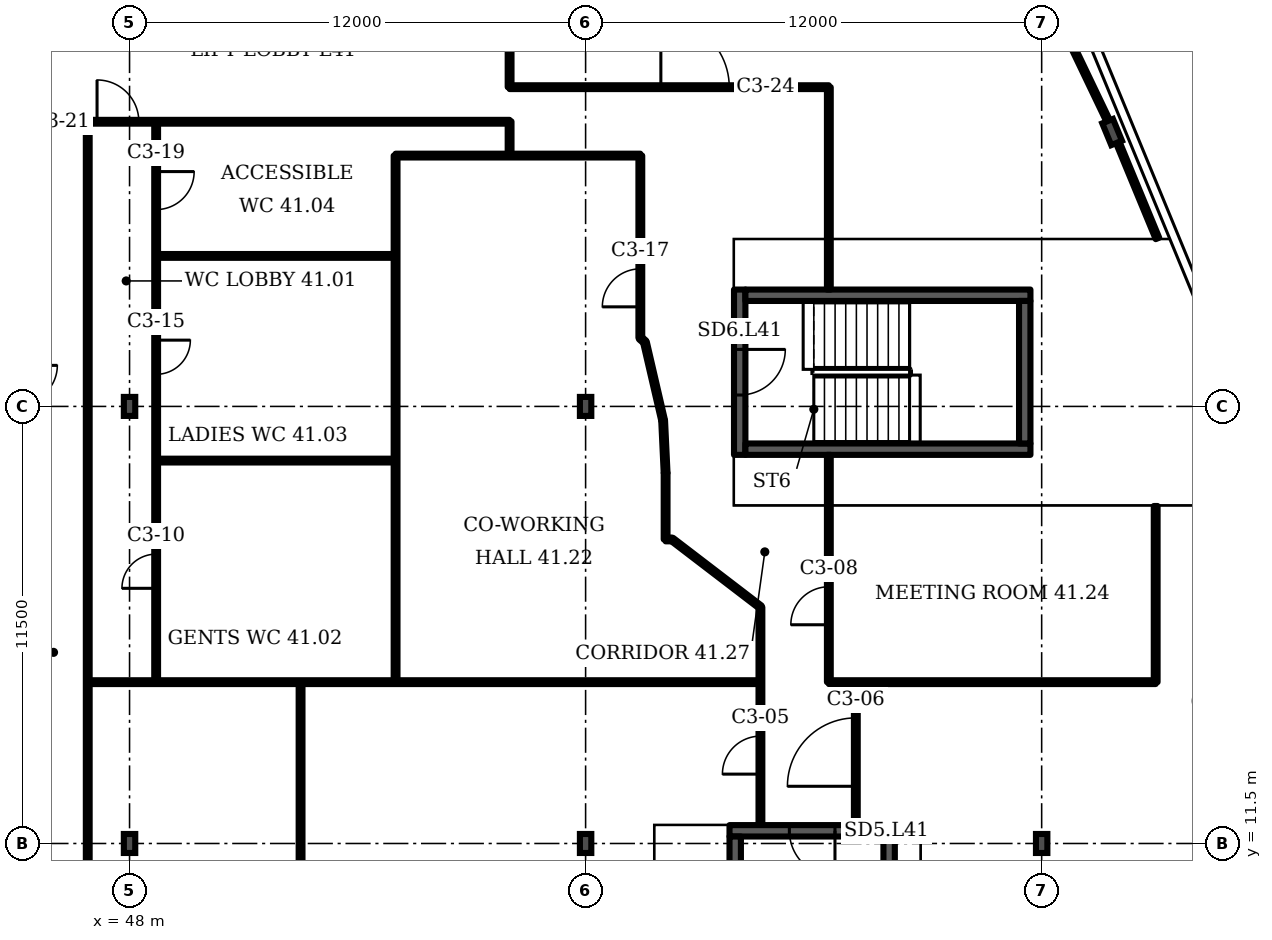
"""IFC4 building model, lengths in metres.
Left out: names, types, materials, properties, quantities, classifications, styles, units other than length and angle.
Written with IfcOpenShell. Run it as: python <this file> out.ifc"""

import sys

from ifc_helpers import new_model, si_unit, direction, frame, frame_2d, origin, origin_2d, place, context, subcontext, project, spatial, rectangle, i_section, extrude, element, fill, save


model = new_model("IFC4")
c1 = context("Model", 3, precision=1e-05, world=origin(), true_north=direction((0.0, 1.0)))
c2 = subcontext(c1, "Body", "Model", "MODEL_VIEW")
j1 = project(units=[si_unit("LENGTHUNIT", "METRE"), si_unit("PLANEANGLEUNIT", "RADIAN")], contexts=[c1])
p1 = place(None, origin())
s1 = spatial("IfcSite", under=j1, at=p1, CompositionType="ELEMENT")
p2 = place(p1, origin())
s2 = spatial("IfcBuilding", under=s1, at=p2, CompositionType="ELEMENT")
p3 = place(p2, frame((0.0, 0.0, 169.9)))
s3 = spatial("IfcBuildingStorey", under=s2, at=p3, CompositionType="ELEMENT", Elevation=169.9)
p4 = place(p3, frame((73.854, 30.219, 0.0), z_axis=(0.0, 0.0, 1.0), x_axis=(0.924325, 0.381602, 0.0)))
e1 = element("IfcColumn", 1, at=p4, inside=s3, PredefinedType="COLUMN", context=c2, shape_type="SweptSolid", body=[
    extrude(i_section(OverallWidth=0.305, OverallDepth=0.62, WebThickness=0.021, FlangeThickness=0.04, FilletRadius=0.027, at=origin_2d()), origin(), (0.0, 0.0, 1.0), 3.6),
])
for number, where, z_axis, x_axis in (
    (2, (48.0, 11.5, 0.0), (0.0, 0.0, 1.0), (1.0, 0.0, 0.0)),
    (3, (60.0, 11.5, 0.0), (0.0, 0.0, 1.0), (1.0, 0.0, 0.0)),
    (4, (72.0, 11.5, 0.0), (0.0, 0.0, 1.0), (1.0, 0.0, 0.0)),
    (5, (48.0, 23.0, 0.0), (0.0, 0.0, 1.0), (1.0, 0.0, 0.0)),
    (6, (60.0, 23.0, 0.0), (0.0, 0.0, 1.0), (1.0, 0.0, 0.0)),
):
    element("IfcColumn", number, at=place(p3, frame(where, z_axis=z_axis, x_axis=x_axis)), inside=s3, PredefinedType="COLUMN", context=c2, shape_type="SweptSolid", body=[
        extrude(i_section(OverallWidth=0.3, OverallDepth=0.5, WebThickness=0.014, FlangeThickness=0.028, FilletRadius=0.027, at=origin_2d()), origin(), (0.0, 0.0, 1.0), 3.6),
    ])
p5 = place(p3, frame((63.786, 11.834, 0.0), z_axis=(0.0, 0.0, 1.0), x_axis=(1.0, 0.0, 0.0)))
e7 = element("IfcWall", 7, at=p5, inside=s3, PredefinedType="SHEAR", context=c2, shape_type="SweptSolid", body=[
    extrude(rectangle(XDim=4.35, YDim=0.3, at=frame_2d((2.175, 0.0))), origin(), (0.0, 0.0, 1.0), 3.2),
])
p6 = place(p5, frame((1.575, 0.0, 0.0)))
e8 = element("IfcOpeningElement", 8, at=p6, cuts=e7, PredefinedType="OPENING", context=c2, shape_type="SweptSolid", body=[
    extrude(rectangle(XDim=1.2, YDim=2.1, at=frame_2d((0.6, 1.05))), frame((0.0, 0.16, 0.0), z_axis=(0.0, -1.0, 0.0), x_axis=(1.0, 0.0, 0.0)), (0.0, 0.0, 1.0), 0.32),
])
p7 = place(p3, frame((64.055, 21.725, 0.0), z_axis=(0.0, 0.0, 1.0), x_axis=(0.0, 1.0, 0.0)))
e9 = element("IfcWall", 9, at=p7, inside=s3, PredefinedType="SHEAR", context=c2, shape_type="SweptSolid", body=[
    extrude(rectangle(XDim=4.35, YDim=0.3, at=frame_2d((2.175, 0.0))), origin(), (0.0, 0.0, 1.0), 3.2),
])
p8 = place(p7, frame((1.575, 0.0, 0.0)))
e10 = element("IfcOpeningElement", 10, at=p8, cuts=e9, PredefinedType="OPENING", context=c2, shape_type="SweptSolid", body=[
    extrude(rectangle(XDim=1.2, YDim=2.1, at=frame_2d((0.6, 1.05))), frame((0.0, 0.16, 0.0), z_axis=(0.0, -1.0, 0.0), x_axis=(1.0, 0.0, 0.0)), (0.0, 0.0, 1.0), 0.32),
])
p9 = place(p3, frame((46.9, 1.087, 0.0), z_axis=(0.0, 0.0, 1.0), x_axis=(0.0, 1.0, 0.0)))
e11 = element("IfcWall", 11, at=p9, inside=s3, PredefinedType="PARTITIONING", context=c2, shape_type="SweptSolid", body=[
    extrude(rectangle(XDim=29.403, YDim=0.1, at=frame_2d((14.702, 0.0))), origin(), (0.0, 0.0, 1.0), 3.2),
])
p10 = place(p9, frame((6.798, 0.0, 0.0)))
e12 = element("IfcOpeningElement", 12, at=p10, cuts=e11, PredefinedType="OPENING", context=c2, shape_type="SweptSolid", body=[
    extrude(rectangle(XDim=1.0, YDim=2.1, at=frame_2d((0.5, 1.05))), frame((0.0, 0.06, 0.0), z_axis=(0.0, -1.0, 0.0), x_axis=(1.0, 0.0, 0.0)), (0.0, 0.0, 1.0), 0.12),
])
p11 = place(p3, frame((46.91, 15.745, 0.0), z_axis=(0.0, 0.0, 1.0), x_axis=(1.0, 0.0, 0.0)))
e13 = element("IfcWall", 13, at=p11, inside=s3, PredefinedType="PARTITIONING", context=c2, shape_type="SweptSolid", body=[
    extrude(rectangle(XDim=17.69, YDim=0.1, at=frame_2d((8.845, 0.0))), origin(), (0.0, 0.0, 1.0), 3.2),
])
p12 = place(p3, frame((46.91, 30.49, 0.0), z_axis=(0.0, 0.0, 1.0), x_axis=(1.0, 0.0, 0.0)))
e14 = element("IfcWall", 14, at=p12, inside=s3, PredefinedType="PARTITIONING", context=c2, shape_type="SweptSolid", body=[
    extrude(rectangle(XDim=11.09, YDim=0.1, at=frame_2d((5.545, 0.0))), origin(), (0.0, 0.0, 1.0), 3.2),
])
p13 = place(p12, frame((0.235, 0.0, 0.0)))
e15 = element("IfcOpeningElement", 15, at=p13, cuts=e14, PredefinedType="OPENING", context=c2, shape_type="SweptSolid", body=[
    extrude(rectangle(XDim=1.1, YDim=2.1, at=frame_2d((0.55, 1.05))), frame((0.0, 0.06, 0.0), z_axis=(0.0, -1.0, 0.0), x_axis=(1.0, 0.0, 0.0)), (0.0, 0.0, 1.0), 0.12),
])
p14 = place(p3, frame((48.7, 15.745, 0.0), z_axis=(0.0, 0.0, 1.0), x_axis=(0.0, 1.0, 0.0)))
e16 = element("IfcWall", 16, at=p14, inside=s3, PredefinedType="PARTITIONING", context=c2, shape_type="SweptSolid", body=[
    extrude(rectangle(XDim=14.745, YDim=0.1, at=frame_2d((7.373, 0.0))), origin(), (0.0, 0.0, 1.0), 3.2),
])
p15 = place(p14, frame((2.469, 0.0, 0.0)))
e17 = element("IfcOpeningElement", 17, at=p15, cuts=e16, PredefinedType="OPENING", context=c2, shape_type="SweptSolid", body=[
    extrude(rectangle(XDim=0.9, YDim=2.1, at=frame_2d((0.45, 1.05))), frame((0.0, 0.06, 0.0), z_axis=(0.0, -1.0, 0.0), x_axis=(1.0, 0.0, 0.0)), (0.0, 0.0, 1.0), 0.12),
])
p16 = place(p14, frame((8.099, 0.0, 0.0)))
e18 = element("IfcOpeningElement", 18, at=p16, cuts=e16, PredefinedType="OPENING", context=c2, shape_type="SweptSolid", body=[
    extrude(rectangle(XDim=0.9, YDim=2.1, at=frame_2d((0.45, 1.05))), frame((0.0, 0.06, 0.0), z_axis=(0.0, -1.0, 0.0), x_axis=(1.0, 0.0, 0.0)), (0.0, 0.0, 1.0), 0.12),
])
p17 = place(p14, frame((12.434, 0.0, 0.0)))
e19 = element("IfcOpeningElement", 19, at=p17, cuts=e16, PredefinedType="OPENING", context=c2, shape_type="SweptSolid", body=[
    extrude(rectangle(XDim=1.0, YDim=2.1, at=frame_2d((0.5, 1.05))), frame((0.0, 0.06, 0.0), z_axis=(0.0, -1.0, 0.0), x_axis=(1.0, 0.0, 0.0)), (0.0, 0.0, 1.0), 0.12),
])
for number, where, z_axis, x_axis in (
    (20, (48.7, 21.575, 0.0), (0.0, 0.0, 1.0), (1.0, 0.0, 0.0)),
    (21, (48.7, 26.96, 0.0), (0.0, 0.0, 1.0), (1.0, 0.0, 0.0)),
):
    element("IfcWall", number, at=place(p3, frame(where, z_axis=z_axis, x_axis=x_axis)), inside=s3, PredefinedType="PARTITIONING", context=c2, shape_type="SweptSolid", body=[
        extrude(rectangle(XDim=6.3, YDim=0.1, at=frame_2d((3.15, 0.0))), origin(), (0.0, 0.0, 1.0), 3.2),
    ])
p18 = place(p3, frame((52.5, 1.98, 0.0), z_axis=(0.0, 0.0, 1.0), x_axis=(0.0, 1.0, 0.0)))
e22 = element("IfcWall", 22, at=p18, inside=s3, PredefinedType="PARTITIONING", context=c2, shape_type="SweptSolid", body=[
    extrude(rectangle(XDim=13.765, YDim=0.1, at=frame_2d((6.883, 0.0))), origin(), (0.0, 0.0, 1.0), 3.2),
])
p19 = place(p3, frame((55.0, 15.745, 0.0), z_axis=(0.0, 0.0, 1.0), x_axis=(0.0, 1.0, 0.0)))
e23 = element("IfcWall", 23, at=p19, inside=s3, PredefinedType="PARTITIONING", context=c2, shape_type="SweptSolid", body=[
    extrude(rectangle(XDim=13.855, YDim=0.1, at=frame_2d((6.927, 0.0))), origin(), (0.0, 0.0, 1.0), 3.2),
])
p20 = place(p3, frame((55.0, 29.6, 0.0), z_axis=(0.0, 0.0, 1.0), x_axis=(1.0, 0.0, 0.0)))
e24 = element("IfcWall", 24, at=p20, inside=s3, PredefinedType="PARTITIONING", context=c2, shape_type="SweptSolid", body=[
    extrude(rectangle(XDim=6.44, YDim=0.1, at=frame_2d((3.22, 0.0))), origin(), (0.0, 0.0, 1.0), 3.2),
])
p21 = place(p3, frame((58.0, 29.6, 0.0), z_axis=(0.0, 0.0, 1.0), x_axis=(0.0, 1.0, 0.0)))
e25 = element("IfcWall", 25, at=p21, inside=s3, PredefinedType="PARTITIONING", context=c2, shape_type="SweptSolid", body=[
    extrude(rectangle(XDim=0.9, YDim=0.1, at=frame_2d((0.45, 0.0))), origin(), (0.0, 0.0, 1.0), 3.2),
])
p22 = place(p3, frame((58.0, 31.4, 0.0), z_axis=(0.0, 0.0, 1.0), x_axis=(0.0, 1.0, 0.0)))
e26 = element("IfcWall", 26, at=p22, inside=s3, PredefinedType="PARTITIONING", context=c2, shape_type="SweptSolid", body=[
    extrude(rectangle(XDim=2.58, YDim=0.1, at=frame_2d((1.29, 0.0))), origin(), (0.0, 0.0, 1.0), 3.2),
])
p23 = place(p3, frame((58.0, 31.4, 0.0), z_axis=(0.0, 0.0, 1.0), x_axis=(1.0, 0.0, 0.0)))
e27 = element("IfcWall", 27, at=p23, inside=s3, PredefinedType="PARTITIONING", context=c2, shape_type="SweptSolid", body=[
    extrude(rectangle(XDim=8.4, YDim=0.1, at=frame_2d((4.2, 0.0))), origin(), (0.0, 0.0, 1.0), 3.2),
])
p24 = place(p23, frame((3.98, 0.0, 0.0)))
e28 = element("IfcOpeningElement", 28, at=p24, cuts=e27, PredefinedType="OPENING", context=c2, shape_type="SweptSolid", body=[
    extrude(rectangle(XDim=1.8, YDim=2.1, at=frame_2d((0.9, 1.05))), frame((0.0, 0.06, 0.0), z_axis=(0.0, -1.0, 0.0), x_axis=(1.0, 0.0, 0.0)), (0.0, 0.0, 1.0), 0.12),
])
p25 = place(p3, frame((61.44, 24.8, 0.0), z_axis=(0.0, 0.0, 1.0), x_axis=(0.0, 1.0, 0.0)))
e29 = element("IfcWall", 29, at=p25, inside=s3, PredefinedType="PARTITIONING", context=c2, shape_type="SweptSolid", body=[
    extrude(rectangle(XDim=4.8, YDim=0.1, at=frame_2d((2.4, 0.0))), origin(), (0.0, 0.0, 1.0), 3.2),
])
p26 = place(p25, frame((0.82, 0.0, 0.0)))
e30 = element("IfcOpeningElement", 30, at=p26, cuts=e29, PredefinedType="OPENING", context=c2, shape_type="SweptSolid", body=[
    extrude(rectangle(XDim=1.0, YDim=2.1, at=frame_2d((0.5, 1.05))), frame((0.0, 0.06, 0.0), z_axis=(0.0, -1.0, 0.0), x_axis=(1.0, 0.0, 0.0)), (0.0, 0.0, 1.0), 0.12),
])
p27 = place(p3, frame((61.56, 24.695, 0.0), z_axis=(0.0, 0.0, 1.0), x_axis=(-0.752958, 0.658073, 0.0)))
e31 = element("IfcWall", 31, at=p27, inside=s3, PredefinedType="PARTITIONING", context=c2, shape_type="SweptSolid", body=[
    extrude(rectangle(XDim=0.159, YDim=0.1, at=frame_2d((0.08, 0.0))), origin(), (0.0, 0.0, 1.0), 3.2),
])
p28 = place(p3, frame((62.04, 22.63, 0.0), z_axis=(0.0, 0.0, 1.0), x_axis=(-0.226381, 0.974037, 0.0)))
e32 = element("IfcWall", 32, at=p28, inside=s3, PredefinedType="PARTITIONING", context=c2, shape_type="SweptSolid", body=[
    extrude(rectangle(XDim=2.12, YDim=0.1, at=frame_2d((1.06, 0.0))), origin(), (0.0, 0.0, 1.0), 3.2),
])
p29 = place(p3, frame((62.105, 19.5, 0.0), z_axis=(0.0, 0.0, 1.0), x_axis=(0.0, 1.0, 0.0)))
e33 = element("IfcWall", 33, at=p29, inside=s3, PredefinedType="PARTITIONING", context=c2, shape_type="SweptSolid", body=[
    extrude(rectangle(XDim=1.75, YDim=0.1, at=frame_2d((0.875, 0.0))), origin(), (0.0, 0.0, 1.0), 3.2),
])
p30 = place(p3, frame((62.105, 19.5, 0.0), z_axis=(0.0, 0.0, 1.0), x_axis=(1.0, 0.0, 0.0)))
e34 = element("IfcWall", 34, at=p30, inside=s3, PredefinedType="PARTITIONING", context=c2, shape_type="SweptSolid", body=[
    extrude(rectangle(XDim=0.17, YDim=0.1, at=frame_2d((0.085, 0.0))), origin(), (0.0, 0.0, 1.0), 3.2),
])
p31 = place(p3, frame((62.105, 21.25, 0.0), z_axis=(0.0, 0.0, 1.0), x_axis=(-0.047011, 0.998895, 0.0)))
e35 = element("IfcWall", 35, at=p31, inside=s3, PredefinedType="PARTITIONING", context=c2, shape_type="SweptSolid", body=[
    extrude(rectangle(XDim=1.381, YDim=0.1, at=frame_2d((0.691, 0.0))), origin(), (0.0, 0.0, 1.0), 3.2),
])
p32 = place(p3, frame((64.6, 12.004, 0.0), z_axis=(0.0, 0.0, 1.0), x_axis=(0.0, 1.0, 0.0)))
e36 = element("IfcWall", 36, at=p32, inside=s3, PredefinedType="PARTITIONING", context=c2, shape_type="SweptSolid", body=[
    extrude(rectangle(XDim=5.716, YDim=0.1, at=frame_2d((2.858, 0.0))), origin(), (0.0, 0.0, 1.0), 3.2),
])
p33 = place(p32, frame((1.321, 0.0, 0.0)))
e37 = element("IfcOpeningElement", 37, at=p33, cuts=e36, PredefinedType="OPENING", context=c2, shape_type="SweptSolid", body=[
    extrude(rectangle(XDim=1.0, YDim=2.1, at=frame_2d((0.5, 1.05))), frame((0.0, 0.06, 0.0), z_axis=(0.0, -1.0, 0.0), x_axis=(1.0, 0.0, 0.0)), (0.0, 0.0, 1.0), 0.12),
])
p34 = place(p3, frame((64.6, 17.72, 0.0), z_axis=(0.0, 0.0, 1.0), x_axis=(-0.794036, 0.607866, 0.0)))
e38 = element("IfcWall", 38, at=p34, inside=s3, PredefinedType="PARTITIONING", context=c2, shape_type="SweptSolid", body=[
    extrude(rectangle(XDim=2.928, YDim=0.1, at=frame_2d((1.464, 0.0))), origin(), (0.0, 0.0, 1.0), 3.2),
])
p35 = place(p3, frame((66.4, 15.745, 0.0), z_axis=(0.0, 0.0, 1.0), x_axis=(0.0, 1.0, 0.0)))
e39 = element("IfcWall", 39, at=p35, inside=s3, PredefinedType="PARTITIONING", context=c2, shape_type="SweptSolid", body=[
    extrude(rectangle(XDim=5.98, YDim=0.1, at=frame_2d((2.99, 0.0))), origin(), (0.0, 0.0, 1.0), 3.2),
])
p36 = place(p35, frame((1.51, 0.0, 0.0)))
e40 = element("IfcOpeningElement", 40, at=p36, cuts=e39, PredefinedType="OPENING", context=c2, shape_type="SweptSolid", body=[
    extrude(rectangle(XDim=1.0, YDim=2.1, at=frame_2d((0.5, 1.05))), frame((0.0, 0.06, 0.0), z_axis=(0.0, -1.0, 0.0), x_axis=(1.0, 0.0, 0.0)), (0.0, 0.0, 1.0), 0.12),
])
p37 = place(p3, frame((66.4, 15.745, 0.0), z_axis=(0.0, 0.0, 1.0), x_axis=(1.0, 0.0, 0.0)))
e41 = element("IfcWall", 41, at=p37, inside=s3, PredefinedType="PARTITIONING", context=c2, shape_type="SweptSolid", body=[
    extrude(rectangle(XDim=8.6, YDim=0.1, at=frame_2d((4.3, 0.0))), origin(), (0.0, 0.0, 1.0), 3.2),
])
p38 = place(p3, frame((66.4, 26.075, 0.0), z_axis=(0.0, 0.0, 1.0), x_axis=(0.0, 1.0, 0.0)))
e42 = element("IfcWall", 42, at=p38, inside=s3, PredefinedType="PARTITIONING", context=c2, shape_type="SweptSolid", body=[
    extrude(rectangle(XDim=5.325, YDim=0.1, at=frame_2d((2.663, 0.0))), origin(), (0.0, 0.0, 1.0), 3.2),
])
p39 = place(p3, frame((67.11, 12.004, 0.0), z_axis=(0.0, 0.0, 1.0), x_axis=(0.0, 1.0, 0.0)))
e43 = element("IfcWall", 43, at=p39, inside=s3, PredefinedType="PARTITIONING", context=c2, shape_type="SweptSolid", body=[
    extrude(rectangle(XDim=3.741, YDim=0.1, at=frame_2d((1.871, 0.0))), origin(), (0.0, 0.0, 1.0), 3.2),
])
p40 = place(p39, frame((1.001, 0.0, 0.0)))
e44 = element("IfcOpeningElement", 44, at=p40, cuts=e43, PredefinedType="OPENING", context=c2, shape_type="SweptSolid", body=[
    extrude(rectangle(XDim=1.8, YDim=2.1, at=frame_2d((0.9, 1.05))), frame((0.0, 0.06, 0.0), z_axis=(0.0, -1.0, 0.0), x_axis=(1.0, 0.0, 0.0)), (0.0, 0.0, 1.0), 0.12),
])
p41 = place(p3, frame((73.885, 30.23, 0.0), z_axis=(0.0, 0.0, 1.0), x_axis=(-0.432129, 0.901808, 0.0)))
e45 = element("IfcWall", 45, at=p41, inside=s3, PredefinedType="PARTITIONING", context=c2, shape_type="SweptSolid", body=[
    extrude(rectangle(XDim=13.029, YDim=0.1, at=frame_2d((6.515, 0.0))), origin(), (0.0, 0.0, 1.0), 3.2),
])
p42 = place(p3, frame((75.0, 15.745, 0.0), z_axis=(0.0, 0.0, 1.0), x_axis=(0.0, 1.0, 0.0)))
e46 = element("IfcWall", 46, at=p42, inside=s3, PredefinedType="PARTITIONING", context=c2, shape_type="SweptSolid", body=[
    extrude(rectangle(XDim=4.635, YDim=0.1, at=frame_2d((2.317, 0.0))), origin(), (0.0, 0.0, 1.0), 3.2),
])
p43 = place(p3, frame((75.047, 27.42, 0.0), z_axis=(0.0, 0.0, 1.0), x_axis=(-0.382024, 0.924148, 0.0)))
e47 = element("IfcWall", 47, at=p43, inside=s3, PredefinedType="PARTITIONING", context=c2, shape_type="SweptSolid", body=[
    extrude(rectangle(XDim=3.041, YDim=0.1, at=frame_2d((1.521, 0.0))), origin(), (0.0, 0.0, 1.0), 2.58),
])
for number, where, z_axis, x_axis in (
    (48, (63.936, 4.184, 0.0), (0.0, 0.0, 1.0), (0.0, 1.0, 0.0)),
    (49, (67.986, 4.184, 0.0), (0.0, 0.0, 1.0), (0.0, 1.0, 0.0)),
    (50, (64.205, 21.875, 0.0), (0.0, 0.0, 1.0), (1.0, 0.0, 0.0)),
    (51, (64.205, 25.925, 0.0), (0.0, 0.0, 1.0), (1.0, 0.0, 0.0)),
):
    element("IfcWall", number, at=place(p3, frame(where, z_axis=z_axis, x_axis=x_axis)), inside=s3, PredefinedType="SHEAR", context=c2, shape_type="SweptSolid", body=[
        extrude(rectangle(XDim=7.5, YDim=0.3, at=frame_2d((3.75, 0.0))), origin(), (0.0, 0.0, 1.0), 3.2),
    ])
p44 = place(p3, frame((71.555, 22.025, 0.0), z_axis=(0.0, 0.0, 1.0), x_axis=(0.0, 1.0, 0.0)))
e52 = element("IfcWall", 52, at=p44, inside=s3, PredefinedType="SHEAR", context=c2, shape_type="SweptSolid", body=[
    extrude(rectangle(XDim=3.75, YDim=0.3, at=frame_2d((1.875, 0.0))), origin(), (0.0, 0.0, 1.0), 3.2),
])
p45 = place(p6, origin())
e53 = element("IfcDoor", 53, at=p45, inside=s3, OperationType="SINGLE_SWING_RIGHT", PredefinedType="DOOR", context=c2, shape_type="SweptSolid", body=[
    extrude(rectangle(XDim=1.2, YDim=2.1, at=frame_2d((0.6, 1.05))), frame((0.0, 0.025, 0.0), z_axis=(0.0, -1.0, 0.0), x_axis=(1.0, 0.0, 0.0)), (0.0, 0.0, 1.0), 0.05),
])
fill(e8, e53)
p46 = place(p8, origin())
e54 = element("IfcDoor", 54, at=p46, inside=s3, OperationType="SINGLE_SWING_RIGHT", PredefinedType="DOOR", context=c2, shape_type="SweptSolid", body=[
    extrude(rectangle(XDim=1.2, YDim=2.1, at=frame_2d((0.6, 1.05))), frame((0.0, 0.025, 0.0), z_axis=(0.0, -1.0, 0.0), x_axis=(1.0, 0.0, 0.0)), (0.0, 0.0, 1.0), 0.05),
])
fill(e10, e54)
p47 = place(p33, origin())
e55 = element("IfcDoor", 55, at=p47, inside=s3, OperationType="SINGLE_SWING_LEFT", PredefinedType="DOOR", context=c2, shape_type="SweptSolid", body=[
    extrude(rectangle(XDim=1.0, YDim=2.1, at=frame_2d((0.5, 1.05))), frame((0.0, 0.025, 0.0), z_axis=(0.0, -1.0, 0.0), x_axis=(1.0, 0.0, 0.0)), (0.0, 0.0, 1.0), 0.05),
])
fill(e37, e55)
p48 = place(p40, origin())
e56 = element("IfcDoor", 56, at=p48, inside=s3, OperationType="DOUBLE_DOOR_SINGLE_SWING", PredefinedType="DOOR", context=c2, shape_type="SweptSolid", body=[
    extrude(rectangle(XDim=1.8, YDim=2.1, at=frame_2d((0.9, 1.05))), frame((0.0, 0.025, 0.0), z_axis=(0.0, -1.0, 0.0), x_axis=(1.0, 0.0, 0.0)), (0.0, 0.0, 1.0), 0.05),
])
fill(e44, e56)
p49 = place(p36, origin())
e57 = element("IfcDoor", 57, at=p49, inside=s3, OperationType="SINGLE_SWING_LEFT", PredefinedType="DOOR", context=c2, shape_type="SweptSolid", body=[
    extrude(rectangle(XDim=1.0, YDim=2.1, at=frame_2d((0.5, 1.05))), frame((0.0, 0.025, 0.0), z_axis=(0.0, -1.0, 0.0), x_axis=(1.0, 0.0, 0.0)), (0.0, 0.0, 1.0), 0.05),
])
fill(e40, e57)
p50 = place(p15, origin())
e58 = element("IfcDoor", 58, at=p50, inside=s3, OperationType="SINGLE_SWING_LEFT", PredefinedType="DOOR", context=c2, shape_type="SweptSolid", body=[
    extrude(rectangle(XDim=0.9, YDim=2.1, at=frame_2d((0.45, 1.05))), frame((0.0, 0.025, 0.0), z_axis=(0.0, -1.0, 0.0), x_axis=(1.0, 0.0, 0.0)), (0.0, 0.0, 1.0), 0.05),
])
fill(e17, e58)
p51 = place(p16, origin())
e59 = element("IfcDoor", 59, at=p51, inside=s3, OperationType="SINGLE_SWING_RIGHT", PredefinedType="DOOR", context=c2, shape_type="SweptSolid", body=[
    extrude(rectangle(XDim=0.9, YDim=2.1, at=frame_2d((0.45, 1.05))), frame((0.0, 0.025, 0.0), z_axis=(0.0, -1.0, 0.0), x_axis=(1.0, 0.0, 0.0)), (0.0, 0.0, 1.0), 0.05),
])
fill(e18, e59)
p52 = place(p26, origin())
e60 = element("IfcDoor", 60, at=p52, inside=s3, OperationType="SINGLE_SWING_LEFT", PredefinedType="DOOR", context=c2, shape_type="SweptSolid", body=[
    extrude(rectangle(XDim=1.0, YDim=2.1, at=frame_2d((0.5, 1.05))), frame((0.0, 0.025, 0.0), z_axis=(0.0, -1.0, 0.0), x_axis=(1.0, 0.0, 0.0)), (0.0, 0.0, 1.0), 0.05),
])
fill(e30, e60)
p53 = place(p17, origin())
e61 = element("IfcDoor", 61, at=p53, inside=s3, OperationType="SINGLE_SWING_RIGHT", PredefinedType="DOOR", context=c2, shape_type="SweptSolid", body=[
    extrude(rectangle(XDim=1.0, YDim=2.1, at=frame_2d((0.5, 1.05))), frame((0.0, 0.025, 0.0), z_axis=(0.0, -1.0, 0.0), x_axis=(1.0, 0.0, 0.0)), (0.0, 0.0, 1.0), 0.05),
])
fill(e19, e61)
p54 = place(p13, origin())
e62 = element("IfcDoor", 62, at=p54, inside=s3, OperationType="SINGLE_SWING_LEFT", PredefinedType="DOOR", context=c2, shape_type="SweptSolid", body=[
    extrude(rectangle(XDim=1.1, YDim=2.1, at=frame_2d((0.55, 1.05))), frame((0.0, 0.025, 0.0), z_axis=(0.0, -1.0, 0.0), x_axis=(1.0, 0.0, 0.0)), (0.0, 0.0, 1.0), 0.05),
])
fill(e15, e62)
p55 = place(p24, origin())
e63 = element("IfcDoor", 63, at=p55, inside=s3, OperationType="DOUBLE_DOOR_SINGLE_SWING", PredefinedType="DOOR", context=c2, shape_type="SweptSolid", body=[
    extrude(rectangle(XDim=1.8, YDim=2.1, at=frame_2d((0.9, 1.05))), frame((0.0, 0.025, 0.0), z_axis=(0.0, -1.0, 0.0), x_axis=(1.0, 0.0, 0.0)), (0.0, 0.0, 1.0), 0.05),
])
fill(e28, e63)
save(model, sys.argv[1])
